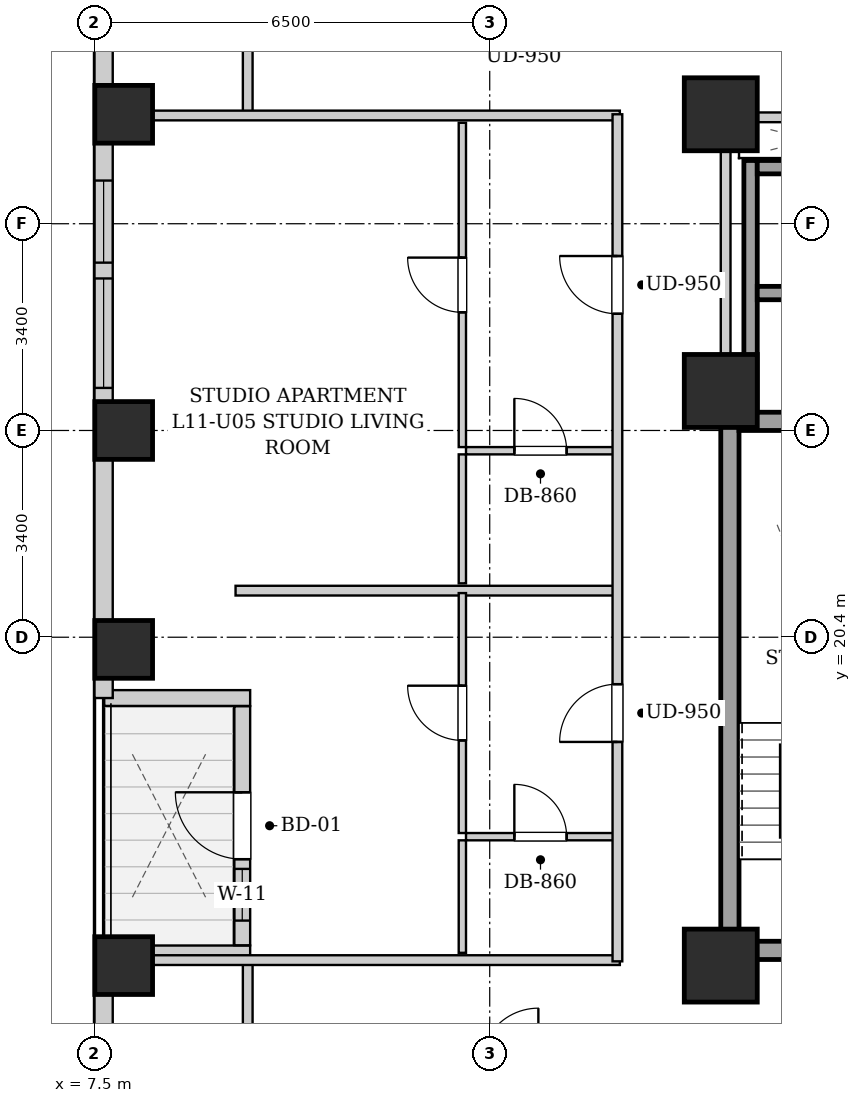
"""IFC4 building model, lengths in metres.
Left out: names, types, materials, properties, quantities, classifications, styles, units other than length and angle.
Written with IfcOpenShell. Run it as: python <this file> out.ifc"""

import sys

from ifc_helpers import new_model, si_unit, direction, frame, frame_2d, origin, origin_2d, place, context, subcontext, project, spatial, rectangle, extrude, element, fill, save


model = new_model("IFC4")
c1 = context("Model", 3, precision=1e-05, world=origin(), true_north=direction((0.0, 1.0)))
c2 = subcontext(c1, "Body", "Model", "MODEL_VIEW")
j1 = project(units=[si_unit("LENGTHUNIT", "METRE"), si_unit("PLANEANGLEUNIT", "RADIAN")], contexts=[c1])
p1 = place(None, origin())
s1 = spatial("IfcSite", under=j1, at=p1, CompositionType="ELEMENT")
p2 = place(p1, origin())
s2 = spatial("IfcBuilding", under=s1, at=p2, CompositionType="ELEMENT")
p3 = place(p2, frame((0.0, 0.0, 45.0)))
s3 = spatial("IfcBuildingStorey", under=s2, at=p3, CompositionType="ELEMENT", Elevation=45.0)
for number, where, z_axis, x_axis in (
    (1, (7.98, 15.0, 0.0), (0.0, 0.0, 1.0), (1.0, 0.0, 0.0)),
    (2, (7.98, 20.2, 0.0), (0.0, 0.0, 1.0), (1.0, 0.0, 0.0)),
    (3, (7.98, 23.8, 0.0), (0.0, 0.0, 1.0), (1.0, 0.0, 0.0)),
    (4, (7.98, 29.0, 0.0), (0.0, 0.0, 1.0), (1.0, 0.0, 0.0)),
):
    element("IfcColumn", number, at=place(p3, frame(where, z_axis=z_axis, x_axis=x_axis)), inside=s3, PredefinedType="COLUMN", context=c2, shape_type="SweptSolid", body=[
        extrude(rectangle(XDim=0.95, YDim=0.95, at=origin_2d()), origin(), (0.0, 0.0, 1.0), 3.2),
    ])
for number, where, z_axis, x_axis in (
    (5, (17.8, 15.0, 0.0), (0.0, 0.0, 1.0), (1.0, 0.0, 0.0)),
    (6, (17.8, 29.0, 0.0), (0.0, 0.0, 1.0), (1.0, 0.0, 0.0)),
    (7, (17.8, 24.45, 0.0), (0.0, 0.0, 1.0), (1.0, 0.0, 0.0)),
):
    element("IfcColumn", number, at=place(p3, frame(where, z_axis=z_axis, x_axis=x_axis)), inside=s3, PredefinedType="COLUMN", context=c2, shape_type="SweptSolid", body=[
        extrude(rectangle(XDim=1.2, YDim=1.2, at=origin_2d()), origin(), (0.0, 0.0, 1.0), 3.2),
    ])
p4 = place(p3, frame((7.65, 2.5, 0.0), z_axis=(0.0, 0.0, 1.0), x_axis=(0.0, 1.0, 0.0)))
e8 = element("IfcWall", 8, at=p4, inside=s3, PredefinedType="SOLIDWALL", context=c2, shape_type="SweptSolid", body=[
    extrude(rectangle(XDim=12.7, YDim=0.3, at=frame_2d((6.35, 0.0))), origin(), (0.0, 0.0, 1.0), 1.975),
])
p5 = place(p4, frame((3.257, 0.0, 0.55)))
e9 = element("IfcOpeningElement", 9, at=p5, cuts=e8, PredefinedType="OPENING", context=c2, shape_type="SweptSolid", body=[
    extrude(rectangle(XDim=1.8, YDim=1.2, at=frame_2d((0.9, 0.6))), frame((0.0, 0.16, 0.0), z_axis=(0.0, -1.0, 0.0), x_axis=(1.0, 0.0, 0.0)), (0.0, 0.0, 1.0), 0.32),
])
p6 = place(p4, frame((1.185, 0.0, 0.55)))
e10 = element("IfcOpeningElement", 10, at=p6, cuts=e8, PredefinedType="OPENING", context=c2, shape_type="SweptSolid", body=[
    extrude(rectangle(XDim=1.35, YDim=1.2, at=frame_2d((0.675, 0.6))), frame((0.0, 0.16, 0.0), z_axis=(0.0, -1.0, 0.0), x_axis=(1.0, 0.0, 0.0)), (0.0, 0.0, 1.0), 0.32),
])
p7 = place(p3, frame((7.66, 15.2, 0.0), z_axis=(0.0, 0.0, 1.0), x_axis=(1.0, 0.0, 0.0)))
e11 = element("IfcWall", 11, at=p7, inside=s3, PredefinedType="SOLIDWALL", context=c2, shape_type="SweptSolid", body=[
    extrude(rectangle(XDim=2.4, YDim=0.26, at=frame_2d((1.2, 0.0))), origin(), (0.0, 0.0, 1.0), 2.94),
])
p8 = place(p3, frame((9.93, 15.334, 0.0), z_axis=(0.0, 0.0, 1.0), x_axis=(0.0, 1.0, 0.0)))
e12 = element("IfcWall", 12, at=p8, inside=s3, PredefinedType="SOLIDWALL", context=c2, shape_type="SweptSolid", body=[
    extrude(rectangle(XDim=3.932, YDim=0.26, at=frame_2d((1.966, 0.0))), origin(), (0.0, 0.0, 1.0), 2.94),
])
p9 = place(p8, frame((1.416, 0.0, 0.0)))
e13 = element("IfcOpeningElement", 13, at=p9, cuts=e12, PredefinedType="OPENING", context=c2, shape_type="SweptSolid", body=[
    extrude(rectangle(XDim=1.1, YDim=2.0, at=frame_2d((0.55, 1.0))), frame((0.0, 0.14, 0.0), z_axis=(0.0, -1.0, 0.0), x_axis=(1.0, 0.0, 0.0)), (0.0, 0.0, 1.0), 0.28),
])
p10 = place(p8, frame((0.406, 0.0, 0.55)))
e14 = element("IfcOpeningElement", 14, at=p10, cuts=e12, PredefinedType="OPENING", context=c2, shape_type="SweptSolid", body=[
    extrude(rectangle(XDim=0.85, YDim=1.2, at=frame_2d((0.425, 0.6))), frame((0.0, 0.14, 0.0), z_axis=(0.0, -1.0, 0.0), x_axis=(1.0, 0.0, 0.0)), (0.0, 0.0, 1.0), 0.28),
])
p11 = place(p3, frame((10.06, 19.4, 0.0), z_axis=(0.0, 0.0, 1.0), x_axis=(-1.0, 0.0, 0.0)))
e15 = element("IfcWall", 15, at=p11, inside=s3, PredefinedType="SOLIDWALL", context=c2, shape_type="SweptSolid", body=[
    extrude(rectangle(XDim=2.4, YDim=0.26, at=frame_2d((1.2, 0.0))), origin(), (0.0, 0.0, 1.0), 2.94),
])
p12 = place(p3, frame((7.65, 19.4, 0.0), z_axis=(0.0, 0.0, 1.0), x_axis=(0.0, 1.0, 0.0)))
e16 = element("IfcWall", 16, at=p12, inside=s3, PredefinedType="SOLIDWALL", context=c2, shape_type="SweptSolid", body=[
    extrude(rectangle(XDim=25.7, YDim=0.3, at=frame_2d((12.85, 0.0))), origin(), (0.0, 0.0, 1.0), 1.975),
])
p13 = place(p12, frame((20.235, 0.0, 0.55)))
e17 = element("IfcOpeningElement", 17, at=p13, cuts=e16, PredefinedType="OPENING", context=c2, shape_type="SweptSolid", body=[
    extrude(rectangle(XDim=1.8, YDim=1.2, at=frame_2d((0.9, 0.6))), frame((0.0, 0.16, 0.0), z_axis=(0.0, -1.0, 0.0), x_axis=(1.0, 0.0, 0.0)), (0.0, 0.0, 1.0), 0.32),
])
p14 = place(p12, frame((14.635, 0.0, 0.55)))
e18 = element("IfcOpeningElement", 18, at=p14, cuts=e16, PredefinedType="OPENING", context=c2, shape_type="SweptSolid", body=[
    extrude(rectangle(XDim=1.35, YDim=1.2, at=frame_2d((0.675, 0.6))), frame((0.0, 0.16, 0.0), z_axis=(0.0, -1.0, 0.0), x_axis=(1.0, 0.0, 0.0)), (0.0, 0.0, 1.0), 0.32),
])
p15 = place(p12, frame((5.1, 0.0, 0.55)))
e19 = element("IfcOpeningElement", 19, at=p15, cuts=e16, PredefinedType="OPENING", context=c2, shape_type="SweptSolid", body=[
    extrude(rectangle(XDim=1.8, YDim=1.2, at=frame_2d((0.9, 0.6))), frame((0.0, 0.16, 0.0), z_axis=(0.0, -1.0, 0.0), x_axis=(1.0, 0.0, 0.0)), (0.0, 0.0, 1.0), 0.32),
])
p16 = place(p12, frame((7.16, 0.0, 0.55)))
e20 = element("IfcOpeningElement", 20, at=p16, cuts=e16, PredefinedType="OPENING", context=c2, shape_type="SweptSolid", body=[
    extrude(rectangle(XDim=1.35, YDim=1.2, at=frame_2d((0.675, 0.6))), frame((0.0, 0.16, 0.0), z_axis=(0.0, -1.0, 0.0), x_axis=(1.0, 0.0, 0.0)), (0.0, 0.0, 1.0), 0.32),
])
p17 = place(p3, frame((17.95, 15.1, 0.0), z_axis=(0.0, 0.0, 1.0), x_axis=(0.0, 1.0, 0.0)))
e21 = element("IfcWall", 21, at=p17, inside=s3, PredefinedType="SHEAR", context=c2, shape_type="SweptSolid", body=[
    extrude(rectangle(XDim=9.0, YDim=0.3, at=frame_2d((4.5, 0.0))), origin(), (0.0, 0.0, 1.0), 2.94),
])
p18 = place(p3, frame((18.1, 23.95, 0.0), z_axis=(0.0, 0.0, 1.0), x_axis=(1.0, 0.0, 0.0)))
e22 = element("IfcWall", 22, at=p18, inside=s3, PredefinedType="SHEAR", context=c2, shape_type="SweptSolid", body=[
    extrude(rectangle(XDim=2.85, YDim=0.3, at=frame_2d((1.425, 0.0))), origin(), (0.0, 0.0, 1.0), 2.94),
])
p19 = place(p3, frame((18.1, 15.25, 0.0), z_axis=(0.0, 0.0, 1.0), x_axis=(1.0, 0.0, 0.0)))
e23 = element("IfcWall", 23, at=p19, inside=s3, PredefinedType="SHEAR", context=c2, shape_type="SweptSolid", body=[
    extrude(rectangle(XDim=2.85, YDim=0.3, at=frame_2d((1.425, 0.0))), origin(), (0.0, 0.0, 1.0), 2.94),
])
p20 = place(p19, frame((0.86, 0.0, 0.0)))
e24 = element("IfcOpeningElement", 24, at=p20, cuts=e23, PredefinedType="OPENING", context=c2, shape_type="SweptSolid", body=[
    extrude(rectangle(XDim=1.1, YDim=2.05, at=frame_2d((0.55, 1.025))), frame((0.0, 0.16, 0.0), z_axis=(0.0, -1.0, 0.0), x_axis=(1.0, 0.0, 0.0)), (0.0, 0.0, 1.0), 0.32),
])
p21 = place(p3, frame((18.29, 24.1, 0.0), z_axis=(0.0, 0.0, 1.0), x_axis=(0.0, 1.0, 0.0)))
e25 = element("IfcWall", 25, at=p21, inside=s3, PredefinedType="SHEAR", context=c2, shape_type="SweptSolid", body=[
    extrude(rectangle(XDim=4.14, YDim=0.22, at=frame_2d((2.07, 0.0))), origin(), (0.0, 0.0, 1.0), 2.94),
])
for number, where, z_axis, x_axis in (
    (26, (18.4, 26.06, 0.0), (0.0, 0.0, 1.0), (1.0, 0.0, 0.0)),
    (27, (18.4, 28.13, 0.0), (0.0, 0.0, 1.0), (1.0, 0.0, 0.0)),
):
    element("IfcWall", number, at=place(p3, frame(where, z_axis=z_axis, x_axis=x_axis)), inside=s3, PredefinedType="SHEAR", context=c2, shape_type="SweptSolid", body=[
        extrude(rectangle(XDim=1.9, YDim=0.22, at=frame_2d((0.95, 0.0))), origin(), (0.0, 0.0, 1.0), 2.94),
    ])
p22 = place(p3, frame((17.88, 24.12, 0.0), z_axis=(0.0, 0.0, 1.0), x_axis=(0.0, 1.0, 0.0)))
e28 = element("IfcWall", 28, at=p22, inside=s3, PredefinedType="PARTITIONING", context=c2, shape_type="SweptSolid", body=[
    extrude(rectangle(XDim=4.76, YDim=0.16, at=frame_2d((2.38, 0.0))), origin(), (0.0, 0.0, 1.0), 2.94),
])
p23 = place(p3, frame((17.96, 28.95, 0.0), z_axis=(0.0, 0.0, 1.0), x_axis=(1.0, 0.0, 0.0)))
e29 = element("IfcWall", 29, at=p23, inside=s3, PredefinedType="PARTITIONING", context=c2, shape_type="SweptSolid", body=[
    extrude(rectangle(XDim=4.29, YDim=0.16, at=frame_2d((2.145, 0.0))), origin(), (0.0, 0.0, 1.0), 2.155),
])
p24 = place(p23, frame((1.57, 0.0, 0.0)))
e30 = element("IfcOpeningElement", 30, at=p24, cuts=e29, PredefinedType="OPENING", context=c2, shape_type="SweptSolid", body=[
    extrude(rectangle(XDim=0.86, YDim=2.05, at=frame_2d((0.43, 1.025))), frame((0.0, 0.09, 0.0), z_axis=(0.0, -1.0, 0.0), x_axis=(1.0, 0.0, 0.0)), (0.0, 0.0, 1.0), 0.18),
])
for number, where, z_axis, x_axis in (
    (31, (10.02, 13.35, 0.0), (0.0, 0.0, 1.0), (0.0, 1.0, 0.0)),
    (32, (10.02, 28.98, 0.0), (0.0, 0.0, 1.0), (0.0, 1.0, 0.0)),
):
    element("IfcWall", number, at=place(p3, frame(where, z_axis=z_axis, x_axis=x_axis)), inside=s3, PredefinedType="PARTITIONING", context=c2, shape_type="SweptSolid", body=[
        extrude(rectangle(XDim=1.74, YDim=0.16, at=frame_2d((0.87, 0.0))), origin(), (0.0, 0.0, 1.0), 2.94),
    ])
for number, where, z_axis, x_axis in (
    (33, (7.78, 15.09, 0.0), (0.0, 0.0, 1.0), (1.0, 0.0, 0.0)),
    (34, (7.78, 28.98, 0.0), (0.0, 0.0, 1.0), (1.0, 0.0, 0.0)),
):
    element("IfcWall", number, at=place(p3, frame(where, z_axis=z_axis, x_axis=x_axis)), inside=s3, PredefinedType="PARTITIONING", context=c2, shape_type="SweptSolid", body=[
        extrude(rectangle(XDim=8.36, YDim=0.16, at=frame_2d((4.18, 0.0))), origin(), (0.0, 0.0, 1.0), 2.155),
    ])
p25 = place(p3, frame((9.82, 21.166, 0.0), z_axis=(0.0, 0.0, 1.0), x_axis=(1.0, 0.0, 0.0)))
e35 = element("IfcWall", 35, at=p25, inside=s3, PredefinedType="PARTITIONING", context=c2, shape_type="SweptSolid", body=[
    extrude(rectangle(XDim=6.24, YDim=0.16, at=frame_2d((3.12, 0.0))), origin(), (0.0, 0.0, 1.0), 2.94),
])
p26 = place(p3, frame((13.61, 17.12, 0.0), z_axis=(0.0, 0.0, 1.0), x_axis=(1.0, 0.0, 0.0)))
e36 = element("IfcWall", 36, at=p26, inside=s3, PredefinedType="PARTITIONING", context=c2, shape_type="SweptSolid", body=[
    extrude(rectangle(XDim=2.45, YDim=0.12, at=frame_2d((1.225, 0.0))), origin(), (0.0, 0.0, 1.0), 2.94),
])
p27 = place(p26, frame((0.795, 0.0, 0.0)))
e37 = element("IfcOpeningElement", 37, at=p27, cuts=e36, PredefinedType="OPENING", context=c2, shape_type="SweptSolid", body=[
    extrude(rectangle(XDim=0.86, YDim=2.05, at=frame_2d((0.43, 1.025))), frame((0.0, 0.07, 0.0), z_axis=(0.0, -1.0, 0.0), x_axis=(1.0, 0.0, 0.0)), (0.0, 0.0, 1.0), 0.14),
])
p28 = place(p3, frame((13.55, 15.21, 0.0), z_axis=(0.0, 0.0, 1.0), x_axis=(0.0, 1.0, 0.0)))
e38 = element("IfcWall", 38, at=p28, inside=s3, PredefinedType="PARTITIONING", context=c2, shape_type="SweptSolid", body=[
    extrude(rectangle(XDim=1.85, YDim=0.12, at=frame_2d((0.925, 0.0))), origin(), (0.0, 0.0, 1.0), 2.94),
])
p29 = place(p3, frame((13.55, 17.18, 0.0), z_axis=(0.0, 0.0, 1.0), x_axis=(0.0, 1.0, 0.0)))
e39 = element("IfcWall", 39, at=p29, inside=s3, PredefinedType="PARTITIONING", context=c2, shape_type="SweptSolid", body=[
    extrude(rectangle(XDim=3.946, YDim=0.12, at=frame_2d((1.973, 0.0))), origin(), (0.0, 0.0, 1.0), 2.94),
])
p30 = place(p29, frame((1.523, 0.0, 0.0)))
e40 = element("IfcOpeningElement", 40, at=p30, cuts=e39, PredefinedType="OPENING", context=c2, shape_type="SweptSolid", body=[
    extrude(rectangle(XDim=0.9, YDim=2.05, at=frame_2d((0.45, 1.025))), frame((0.0, 0.07, 0.0), z_axis=(0.0, -1.0, 0.0), x_axis=(1.0, 0.0, 0.0)), (0.0, 0.0, 1.0), 0.14),
])
p31 = place(p3, frame((13.61, 23.467, 0.0), z_axis=(0.0, 0.0, 1.0), x_axis=(1.0, 0.0, 0.0)))
e41 = element("IfcWall", 41, at=p31, inside=s3, PredefinedType="PARTITIONING", context=c2, shape_type="SweptSolid", body=[
    extrude(rectangle(XDim=2.45, YDim=0.12, at=frame_2d((1.225, 0.0))), origin(), (0.0, 0.0, 1.0), 2.94),
])
p32 = place(p31, frame((0.795, 0.0, 0.0)))
e42 = element("IfcOpeningElement", 42, at=p32, cuts=e41, PredefinedType="OPENING", context=c2, shape_type="SweptSolid", body=[
    extrude(rectangle(XDim=0.86, YDim=2.05, at=frame_2d((0.43, 1.025))), frame((0.0, 0.07, 0.0), z_axis=(0.0, -1.0, 0.0), x_axis=(1.0, 0.0, 0.0)), (0.0, 0.0, 1.0), 0.14),
])
p33 = place(p3, frame((13.55, 21.286, 0.0), z_axis=(0.0, 0.0, 1.0), x_axis=(0.0, 1.0, 0.0)))
e43 = element("IfcWall", 43, at=p33, inside=s3, PredefinedType="PARTITIONING", context=c2, shape_type="SweptSolid", body=[
    extrude(rectangle(XDim=2.121, YDim=0.12, at=frame_2d((1.061, 0.0))), origin(), (0.0, 0.0, 1.0), 2.94),
])
p34 = place(p3, frame((13.55, 23.527, 0.0), z_axis=(0.0, 0.0, 1.0), x_axis=(0.0, 1.0, 0.0)))
e44 = element("IfcWall", 44, at=p34, inside=s3, PredefinedType="PARTITIONING", context=c2, shape_type="SweptSolid", body=[
    extrude(rectangle(XDim=5.333, YDim=0.12, at=frame_2d((2.667, 0.0))), origin(), (0.0, 0.0, 1.0), 2.94),
])
p35 = place(p34, frame((2.216, 0.0, 0.0)))
e45 = element("IfcOpeningElement", 45, at=p35, cuts=e44, PredefinedType="OPENING", context=c2, shape_type="SweptSolid", body=[
    extrude(rectangle(XDim=0.9, YDim=2.05, at=frame_2d((0.45, 1.025))), frame((0.0, 0.07, 0.0), z_axis=(0.0, -1.0, 0.0), x_axis=(1.0, 0.0, 0.0)), (0.0, 0.0, 1.0), 0.14),
])
p36 = place(p3, frame((16.1, 15.07, 0.0), z_axis=(0.0, 0.0, 1.0), x_axis=(0.0, 1.0, 0.0)))
e46 = element("IfcWall", 46, at=p36, inside=s3, PredefinedType="PARTITIONING", context=c2, shape_type="SweptSolid", body=[
    extrude(rectangle(XDim=13.93, YDim=0.16, at=frame_2d((6.965, 0.0))), origin(), (0.0, 0.0, 1.0), 2.94),
])
p37 = place(p36, frame((3.608, 0.0, 0.0)))
e47 = element("IfcOpeningElement", 47, at=p37, cuts=e46, PredefinedType="OPENING", context=c2, shape_type="SweptSolid", body=[
    extrude(rectangle(XDim=0.95, YDim=2.1, at=frame_2d((0.475, 1.05))), frame((0.0, 0.09, 0.0), z_axis=(0.0, -1.0, 0.0), x_axis=(1.0, 0.0, 0.0)), (0.0, 0.0, 1.0), 0.18),
])
p38 = place(p36, frame((10.649, 0.0, 0.0)))
e48 = element("IfcOpeningElement", 48, at=p38, cuts=e46, PredefinedType="OPENING", context=c2, shape_type="SweptSolid", body=[
    extrude(rectangle(XDim=0.95, YDim=2.1, at=frame_2d((0.475, 1.05))), frame((0.0, 0.09, 0.0), z_axis=(0.0, -1.0, 0.0), x_axis=(1.0, 0.0, 0.0)), (0.0, 0.0, 1.0), 0.18),
])
p39 = place(p27, origin())
e49 = element("IfcDoor", 49, at=p39, inside=s3, OperationType="SINGLE_SWING_LEFT", PredefinedType="DOOR", context=c2, shape_type="SweptSolid", body=[
    extrude(rectangle(XDim=0.86, YDim=2.05, at=frame_2d((0.43, 1.025))), frame((0.0, 0.025, 0.0), z_axis=(0.0, -1.0, 0.0), x_axis=(1.0, 0.0, 0.0)), (0.0, 0.0, 1.0), 0.05),
])
fill(e37, e49)
p40 = place(p30, origin())
e50 = element("IfcDoor", 50, at=p40, inside=s3, OperationType="SINGLE_SWING_RIGHT", PredefinedType="DOOR", context=c2, shape_type="SweptSolid", body=[
    extrude(rectangle(XDim=0.9, YDim=2.05, at=frame_2d((0.45, 1.025))), frame((0.0, 0.025, 0.0), z_axis=(0.0, -1.0, 0.0), x_axis=(1.0, 0.0, 0.0)), (0.0, 0.0, 1.0), 0.05),
])
fill(e40, e50)
p41 = place(p32, origin())
e51 = element("IfcDoor", 51, at=p41, inside=s3, OperationType="SINGLE_SWING_LEFT", PredefinedType="DOOR", context=c2, shape_type="SweptSolid", body=[
    extrude(rectangle(XDim=0.86, YDim=2.05, at=frame_2d((0.43, 1.025))), frame((0.0, 0.025, 0.0), z_axis=(0.0, -1.0, 0.0), x_axis=(1.0, 0.0, 0.0)), (0.0, 0.0, 1.0), 0.05),
])
fill(e42, e51)
p42 = place(p35, origin())
e52 = element("IfcDoor", 52, at=p42, inside=s3, OperationType="SINGLE_SWING_RIGHT", PredefinedType="DOOR", context=c2, shape_type="SweptSolid", body=[
    extrude(rectangle(XDim=0.9, YDim=2.05, at=frame_2d((0.45, 1.025))), frame((0.0, 0.025, 0.0), z_axis=(0.0, -1.0, 0.0), x_axis=(1.0, 0.0, 0.0)), (0.0, 0.0, 1.0), 0.05),
])
fill(e45, e52)
p43 = place(p37, origin())
e53 = element("IfcDoor", 53, at=p43, inside=s3, OperationType="SINGLE_SWING_LEFT", PredefinedType="DOOR", context=c2, shape_type="SweptSolid", body=[
    extrude(rectangle(XDim=0.95, YDim=2.1, at=frame_2d((0.475, 1.05))), frame((0.0, 0.025, 0.0), z_axis=(0.0, -1.0, 0.0), x_axis=(1.0, 0.0, 0.0)), (0.0, 0.0, 1.0), 0.05),
])
fill(e47, e53)
p44 = place(p38, origin())
e54 = element("IfcDoor", 54, at=p44, inside=s3, OperationType="SINGLE_SWING_RIGHT", PredefinedType="DOOR", context=c2, shape_type="SweptSolid", body=[
    extrude(rectangle(XDim=0.95, YDim=2.1, at=frame_2d((0.475, 1.05))), frame((0.0, 0.025, 0.0), z_axis=(0.0, -1.0, 0.0), x_axis=(1.0, 0.0, 0.0)), (0.0, 0.0, 1.0), 0.05),
])
fill(e48, e54)
p45 = place(p9, origin())
e55 = element("IfcDoor", 55, at=p45, inside=s3, OperationType="SINGLE_SWING_RIGHT", PredefinedType="DOOR", context=c2, shape_type="SweptSolid", body=[
    extrude(rectangle(XDim=1.1, YDim=2.0, at=frame_2d((0.55, 1.0))), frame((0.0, 0.025, 0.0), z_axis=(0.0, -1.0, 0.0), x_axis=(1.0, 0.0, 0.0)), (0.0, 0.0, 1.0), 0.05),
])
fill(e13, e55)
p46 = place(p10, origin())
e56 = element("IfcWindow", 56, at=p46, inside=s3, PartitioningType="SINGLE_PANEL", PredefinedType="WINDOW", context=c2, shape_type="SweptSolid", body=[
    extrude(rectangle(XDim=0.85, YDim=1.2, at=frame_2d((0.425, 0.6))), frame((0.0, 0.03, 0.0), z_axis=(0.0, -1.0, 0.0), x_axis=(1.0, 0.0, 0.0)), (0.0, 0.0, 1.0), 0.06),
])
fill(e14, e56)
p47 = place(p15, origin())
e57 = element("IfcWindow", 57, at=p47, inside=s3, PartitioningType="DOUBLE_PANEL_VERTICAL", PredefinedType="WINDOW", context=c2, shape_type="SweptSolid", body=[
    extrude(rectangle(XDim=1.8, YDim=1.2, at=frame_2d((0.9, 0.6))), frame((0.0, 0.03, 0.0), z_axis=(0.0, -1.0, 0.0), x_axis=(1.0, 0.0, 0.0)), (0.0, 0.0, 1.0), 0.06),
])
fill(e19, e57)
p48 = place(p16, origin())
e58 = element("IfcWindow", 58, at=p48, inside=s3, PartitioningType="SINGLE_PANEL", PredefinedType="WINDOW", context=c2, shape_type="SweptSolid", body=[
    extrude(rectangle(XDim=1.35, YDim=1.2, at=frame_2d((0.675, 0.6))), frame((0.0, 0.03, 0.0), z_axis=(0.0, -1.0, 0.0), x_axis=(1.0, 0.0, 0.0)), (0.0, 0.0, 1.0), 0.06),
])
fill(e20, e58)
save(model, sys.argv[1])
